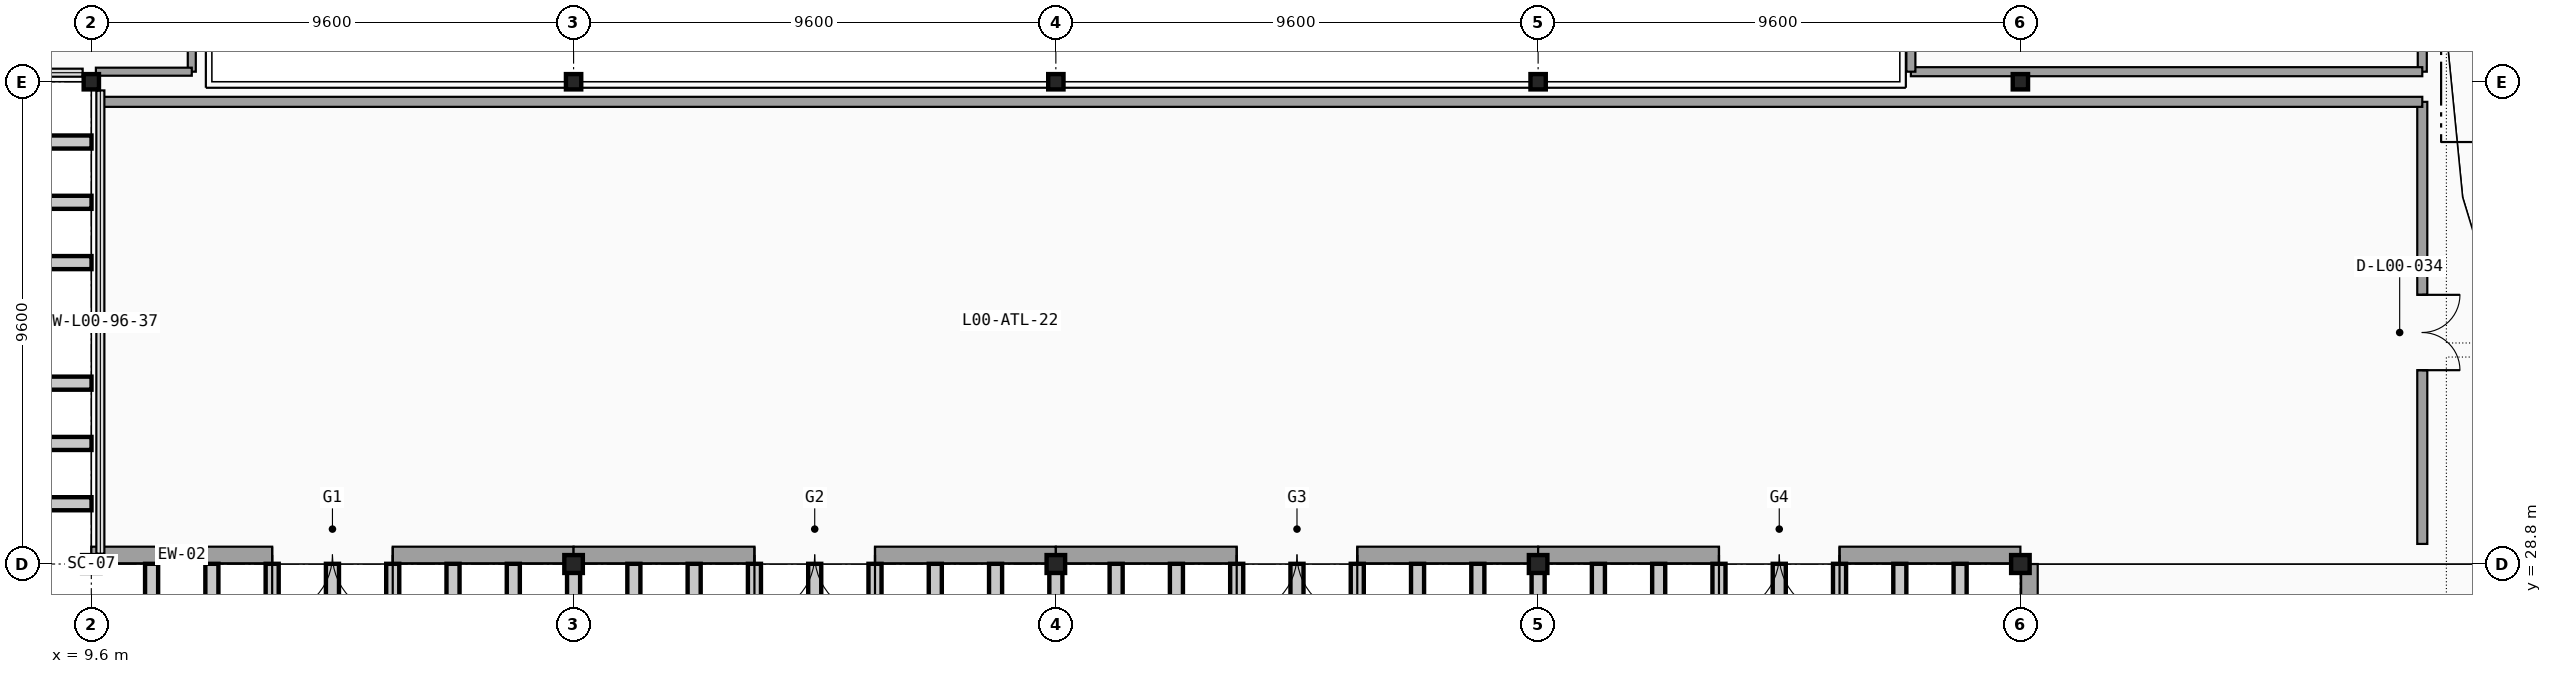
"""IFC4 building model, lengths in metres.
Left out: names, types, materials, properties, quantities, classifications, styles, units other than length and angle.
Written with IfcOpenShell. Run it as: python <this file> out.ifc"""

import sys

from ifc_helpers import new_model, si_unit, direction, frame, frame_2d, origin, origin_2d, place, context, subcontext, project, spatial, rectangle, hollow_rectangle, i_section, extrude, element, fill, save


model = new_model("IFC4")
c1 = context("Model", 3, precision=1e-05, world=origin(), true_north=direction((0.0, 1.0)))
c2 = subcontext(c1, "Body", "Model", "MODEL_VIEW")
j1 = project(units=[si_unit("LENGTHUNIT", "METRE"), si_unit("PLANEANGLEUNIT", "RADIAN")], contexts=[c1])
p1 = place(None, origin())
s1 = spatial("IfcSite", under=j1, at=p1, CompositionType="ELEMENT")
p2 = place(p1, origin())
s2 = spatial("IfcBuilding", under=s1, at=p2, CompositionType="ELEMENT")
p3 = place(p2, origin())
s3 = spatial("IfcBuildingStorey", under=s2, at=p3, CompositionType="ELEMENT", Elevation=0.0)
p4 = place(p3, frame((9.6, 28.8, 0.0), z_axis=(0.0, 0.0, 1.0), x_axis=(1.0, 0.0, 0.0)))
e1 = element("IfcColumn", 1, at=p4, inside=s3, PredefinedType="COLUMN", context=c2, shape_type="SweptSolid", body=[
    extrude(i_section(OverallWidth=0.369, OverallDepth=0.356, WebThickness=0.011, FlangeThickness=0.018, FilletRadius=0.015, at=origin_2d()), origin(), (0.0, 0.0, 1.0), 4.8),
])
p5 = place(p3, frame((9.6, 38.4, 0.0), z_axis=(0.0, 0.0, 1.0), x_axis=(1.0, 0.0, 0.0)))
e2 = element("IfcColumn", 2, at=p5, inside=s3, PredefinedType="COLUMN", context=c2, shape_type="SweptSolid", body=[
    extrude(hollow_rectangle(XDim=0.305, YDim=0.305, WallThickness=0.013, InnerFilletRadius=0.013, OuterFilletRadius=0.025, at=origin_2d()), origin(), (0.0, 0.0, 1.0), 4.8),
])
p6 = place(p3, frame((19.2, 28.8, 0.0), z_axis=(0.0, 0.0, 1.0), x_axis=(1.0, 0.0, 0.0)))
e3 = element("IfcColumn", 3, at=p6, inside=s3, PredefinedType="COLUMN", context=c2, shape_type="SweptSolid", body=[
    extrude(i_section(OverallWidth=0.369, OverallDepth=0.356, WebThickness=0.011, FlangeThickness=0.018, FilletRadius=0.015, at=origin_2d()), origin(), (0.0, 0.0, 1.0), 4.8),
])
p7 = place(p3, frame((19.2, 38.4, 0.0), z_axis=(0.0, 0.0, 1.0), x_axis=(1.0, 0.0, 0.0)))
e4 = element("IfcColumn", 4, at=p7, inside=s3, PredefinedType="COLUMN", context=c2, shape_type="SweptSolid", body=[
    extrude(hollow_rectangle(XDim=0.305, YDim=0.305, WallThickness=0.013, InnerFilletRadius=0.013, OuterFilletRadius=0.025, at=origin_2d()), origin(), (0.0, 0.0, 1.0), 4.8),
])
p8 = place(p3, frame((28.8, 28.8, 0.0), z_axis=(0.0, 0.0, 1.0), x_axis=(1.0, 0.0, 0.0)))
e5 = element("IfcColumn", 5, at=p8, inside=s3, PredefinedType="COLUMN", context=c2, shape_type="SweptSolid", body=[
    extrude(i_section(OverallWidth=0.369, OverallDepth=0.356, WebThickness=0.011, FlangeThickness=0.018, FilletRadius=0.015, at=origin_2d()), origin(), (0.0, 0.0, 1.0), 4.8),
])
p9 = place(p3, frame((28.8, 38.4, 0.0), z_axis=(0.0, 0.0, 1.0), x_axis=(1.0, 0.0, 0.0)))
e6 = element("IfcColumn", 6, at=p9, inside=s3, PredefinedType="COLUMN", context=c2, shape_type="SweptSolid", body=[
    extrude(hollow_rectangle(XDim=0.305, YDim=0.305, WallThickness=0.013, InnerFilletRadius=0.013, OuterFilletRadius=0.025, at=origin_2d()), origin(), (0.0, 0.0, 1.0), 4.8),
])
p10 = place(p3, frame((38.4, 28.8, 0.0), z_axis=(0.0, 0.0, 1.0), x_axis=(1.0, 0.0, 0.0)))
e7 = element("IfcColumn", 7, at=p10, inside=s3, PredefinedType="COLUMN", context=c2, shape_type="SweptSolid", body=[
    extrude(i_section(OverallWidth=0.369, OverallDepth=0.356, WebThickness=0.011, FlangeThickness=0.018, FilletRadius=0.015, at=origin_2d()), origin(), (0.0, 0.0, 1.0), 4.8),
])
p11 = place(p3, frame((38.4, 38.4, 0.0), z_axis=(0.0, 0.0, 1.0), x_axis=(1.0, 0.0, 0.0)))
e8 = element("IfcColumn", 8, at=p11, inside=s3, PredefinedType="COLUMN", context=c2, shape_type="SweptSolid", body=[
    extrude(hollow_rectangle(XDim=0.305, YDim=0.305, WallThickness=0.013, InnerFilletRadius=0.013, OuterFilletRadius=0.025, at=origin_2d()), origin(), (0.0, 0.0, 1.0), 4.8),
])
p12 = place(p3, frame((48.0, 28.8, 0.0), z_axis=(0.0, 0.0, 1.0), x_axis=(1.0, 0.0, 0.0)))
e9 = element("IfcColumn", 9, at=p12, inside=s3, PredefinedType="COLUMN", context=c2, shape_type="SweptSolid", body=[
    extrude(i_section(OverallWidth=0.369, OverallDepth=0.356, WebThickness=0.011, FlangeThickness=0.018, FilletRadius=0.015, at=origin_2d()), origin(), (0.0, 0.0, 1.0), 4.8),
])
p13 = place(p3, frame((48.0, 38.4, 0.0), z_axis=(0.0, 0.0, 1.0), x_axis=(1.0, 0.0, 0.0)))
e10 = element("IfcColumn", 10, at=p13, inside=s3, PredefinedType="COLUMN", context=c2, shape_type="SweptSolid", body=[
    extrude(hollow_rectangle(XDim=0.305, YDim=0.305, WallThickness=0.013, InnerFilletRadius=0.013, OuterFilletRadius=0.025, at=origin_2d()), origin(), (0.0, 0.0, 1.0), 4.8),
])
p14 = place(p3, frame((9.6, 28.98, 0.0), z_axis=(0.0, 0.0, 1.0), x_axis=(1.0, 0.0, 0.0)))
e11 = element("IfcWall", 11, at=p14, inside=s3, PredefinedType="SOLIDWALL", context=c2, shape_type="SweptSolid", body=[
    extrude(rectangle(XDim=9.6, YDim=0.33, at=frame_2d((4.8, 0.0))), origin(), (0.0, 0.0, 1.0), 3.664),
])
p15 = place(p14, frame((6.0, 0.0, 0.0), z_axis=(0.0, 0.0, 1.0), x_axis=(-1.0, 0.0, 0.0)))
e12 = element("IfcOpeningElement", 12, at=p15, cuts=e11, PredefinedType="OPENING", context=c2, shape_type="SweptSolid", body=[
    extrude(rectangle(XDim=2.4, YDim=2.4, at=frame_2d((1.2, 1.2))), frame((0.0, 0.175, 0.0), z_axis=(0.0, -1.0, 0.0), x_axis=(1.0, 0.0, 0.0)), (0.0, 0.0, 1.0), 0.35),
])
p16 = place(p3, frame((19.2, 28.98, 0.0), z_axis=(0.0, 0.0, 1.0), x_axis=(1.0, 0.0, 0.0)))
e13 = element("IfcWall", 13, at=p16, inside=s3, PredefinedType="SOLIDWALL", context=c2, shape_type="SweptSolid", body=[
    extrude(rectangle(XDim=9.6, YDim=0.33, at=frame_2d((4.8, 0.0))), origin(), (0.0, 0.0, 1.0), 3.664),
])
p17 = place(p16, frame((6.0, 0.0, 0.0), z_axis=(0.0, 0.0, 1.0), x_axis=(-1.0, 0.0, 0.0)))
e14 = element("IfcOpeningElement", 14, at=p17, cuts=e13, PredefinedType="OPENING", context=c2, shape_type="SweptSolid", body=[
    extrude(rectangle(XDim=2.4, YDim=2.4, at=frame_2d((1.2, 1.2))), frame((0.0, 0.175, 0.0), z_axis=(0.0, -1.0, 0.0), x_axis=(1.0, 0.0, 0.0)), (0.0, 0.0, 1.0), 0.35),
])
p18 = place(p3, frame((28.8, 28.98, 0.0), z_axis=(0.0, 0.0, 1.0), x_axis=(1.0, 0.0, 0.0)))
e15 = element("IfcWall", 15, at=p18, inside=s3, PredefinedType="SOLIDWALL", context=c2, shape_type="SweptSolid", body=[
    extrude(rectangle(XDim=9.6, YDim=0.33, at=frame_2d((4.8, 0.0))), origin(), (0.0, 0.0, 1.0), 3.664),
])
p19 = place(p18, frame((6.0, 0.0, 0.0), z_axis=(0.0, 0.0, 1.0), x_axis=(-1.0, 0.0, 0.0)))
e16 = element("IfcOpeningElement", 16, at=p19, cuts=e15, PredefinedType="OPENING", context=c2, shape_type="SweptSolid", body=[
    extrude(rectangle(XDim=2.4, YDim=2.4, at=frame_2d((1.2, 1.2))), frame((0.0, 0.175, 0.0), z_axis=(0.0, -1.0, 0.0), x_axis=(1.0, 0.0, 0.0)), (0.0, 0.0, 1.0), 0.35),
])
p20 = place(p3, frame((38.4, 28.98, 0.0), z_axis=(0.0, 0.0, 1.0), x_axis=(1.0, 0.0, 0.0)))
e17 = element("IfcWall", 17, at=p20, inside=s3, PredefinedType="SOLIDWALL", context=c2, shape_type="SweptSolid", body=[
    extrude(rectangle(XDim=9.6, YDim=0.33, at=frame_2d((4.8, 0.0))), origin(), (0.0, 0.0, 1.0), 3.664),
])
p21 = place(p20, frame((6.0, 0.0, 0.0), z_axis=(0.0, 0.0, 1.0), x_axis=(-1.0, 0.0, 0.0)))
e18 = element("IfcOpeningElement", 18, at=p21, cuts=e17, PredefinedType="OPENING", context=c2, shape_type="SweptSolid", body=[
    extrude(rectangle(XDim=2.4, YDim=2.4, at=frame_2d((1.2, 1.2))), frame((0.0, 0.175, 0.0), z_axis=(0.0, -1.0, 0.0), x_axis=(1.0, 0.0, 0.0)), (0.0, 0.0, 1.0), 0.35),
])
p22 = place(p3, frame((48.18, 28.8, 0.0), z_axis=(0.0, 0.0, 1.0), x_axis=(0.0, -1.0, 0.0)))
e19 = element("IfcWall", 19, at=p22, inside=s3, PredefinedType="SOLIDWALL", context=c2, shape_type="SweptSolid", body=[
    extrude(rectangle(XDim=9.6, YDim=0.33, at=frame_2d((4.8, 0.0))), origin(), (0.0, 0.0, 1.0), 3.664),
])
p23 = place(p22, frame((6.0, 0.0, 0.0), z_axis=(0.0, 0.0, 1.0), x_axis=(-1.0, 0.0, 0.0)))
e20 = element("IfcOpeningElement", 20, at=p23, cuts=e19, PredefinedType="OPENING", context=c2, shape_type="SweptSolid", body=[
    extrude(rectangle(XDim=2.4, YDim=2.4, at=frame_2d((1.2, 1.2))), frame((0.0, 0.175, 0.0), z_axis=(0.0, -1.0, 0.0), x_axis=(1.0, 0.0, 0.0)), (0.0, 0.0, 1.0), 0.35),
])
p24 = place(p3, frame((56.0, 38.0, 0.0), z_axis=(0.0, 0.0, 1.0), x_axis=(0.0, -1.0, 0.0)))
e21 = element("IfcWall", 21, at=p24, inside=s3, PredefinedType="PARTITIONING", context=c2, shape_type="SweptSolid", body=[
    extrude(rectangle(XDim=8.8, YDim=0.2, at=frame_2d((4.4, 0.0))), origin(), (0.0, 0.0, 1.0), 3.972),
])
p25 = place(p24, frame((3.842, 0.0, 0.0), z_axis=(0.0, 0.0, 1.0), x_axis=(1.0, 0.0, 0.0)))
e22 = element("IfcOpeningElement", 22, at=p25, cuts=e21, PredefinedType="OPENING", context=c2, shape_type="SweptSolid", body=[
    extrude(rectangle(XDim=1.5, YDim=2.25, at=frame_2d((0.75, 1.125))), frame((0.0, 0.11, 0.0), z_axis=(0.0, -1.0, 0.0), x_axis=(1.0, 0.0, 0.0)), (0.0, 0.0, 1.0), 0.22),
])
p26 = place(p3, frame((9.82, 38.0, 0.0), z_axis=(0.0, 0.0, 1.0), x_axis=(1.0, 0.0, 0.0)))
e23 = element("IfcWall", 23, at=p26, inside=s3, PredefinedType="PARTITIONING", context=c2, shape_type="SweptSolid", body=[
    extrude(rectangle(XDim=46.18, YDim=0.2, at=frame_2d((23.09, 0.0))), origin(), (0.0, 0.0, 1.0), 3.738),
])
p27 = place(p3, frame((56.0, 66.0, 0.0), z_axis=(0.0, 0.0, 1.0), x_axis=(0.0, -1.0, 0.0)))
e24 = element("IfcWall", 24, at=p27, inside=s3, PredefinedType="PARTITIONING", context=c2, shape_type="SweptSolid", body=[
    extrude(rectangle(XDim=27.4, YDim=0.18, at=frame_2d((13.7, 0.0))), origin(), (0.0, 0.0, 1.0), 3.664),
])
p28 = place(p27, frame((2.952, 0.0, 0.0), z_axis=(0.0, 0.0, 1.0), x_axis=(1.0, 0.0, 0.0)))
e25 = element("IfcOpeningElement", 25, at=p28, cuts=e24, PredefinedType="OPENING", context=c2, shape_type="SweptSolid", body=[
    extrude(rectangle(XDim=1.35, YDim=2.25, at=frame_2d((0.675, 1.125))), frame((0.0, 0.1, 0.0), z_axis=(0.0, -1.0, 0.0), x_axis=(1.0, 0.0, 0.0)), (0.0, 0.0, 1.0), 0.2),
])
p29 = place(p3, frame((56.0, 38.6, 0.0), z_axis=(0.0, 0.0, 1.0), x_axis=(-1.0, 0.0, 0.0)))
e26 = element("IfcWall", 26, at=p29, inside=s3, PredefinedType="PARTITIONING", context=c2, shape_type="SweptSolid", body=[
    extrude(rectangle(XDim=10.18, YDim=0.18, at=frame_2d((5.09, 0.0))), origin(), (0.0, 0.0, 1.0), 3.664),
])
p30 = place(p3, frame((45.82, 38.6, 0.0), z_axis=(0.0, 0.0, 1.0), x_axis=(0.0, 1.0, 0.0)))
e27 = element("IfcWall", 27, at=p30, inside=s3, PredefinedType="PARTITIONING", context=c2, shape_type="SweptSolid", body=[
    extrude(rectangle(XDim=27.4, YDim=0.18, at=frame_2d((13.7, 0.0))), origin(), (0.0, 0.0, 1.0), 4.5),
])
p31 = place(p3, frame((11.6, 47.1, 0.0), z_axis=(0.0, 0.0, 1.0), x_axis=(0.0, -1.0, 0.0)))
e28 = element("IfcWall", 28, at=p31, inside=s3, PredefinedType="PARTITIONING", context=c2, shape_type="SweptSolid", body=[
    extrude(rectangle(XDim=8.5, YDim=0.16, at=frame_2d((4.25, 0.0))), origin(), (0.0, 0.0, 1.0), 4.5),
])
p32 = place(p3, frame((11.6, 38.6, 0.0), z_axis=(0.0, 0.0, 1.0), x_axis=(-1.0, 0.0, 0.0)))
e29 = element("IfcWall", 29, at=p32, inside=s3, PredefinedType="PARTITIONING", context=c2, shape_type="SweptSolid", body=[
    extrude(rectangle(XDim=1.909, YDim=0.16, at=frame_2d((0.955, 0.0))), origin(), (0.0, 0.0, 1.0), 3.664),
])
p33 = place(p15, origin())
e30 = element("IfcDoor", 30, at=p33, inside=s3, OperationType="DOUBLE_DOOR_SINGLE_SWING", PredefinedType="DOOR", context=c2, shape_type="SweptSolid", body=[
    extrude(rectangle(XDim=2.4, YDim=2.4, at=frame_2d((1.2, 1.2))), frame((0.0, 0.025, 0.0), z_axis=(0.0, -1.0, 0.0), x_axis=(1.0, 0.0, 0.0)), (0.0, 0.0, 1.0), 0.05),
])
fill(e12, e30)
p34 = place(p17, origin())
e31 = element("IfcDoor", 31, at=p34, inside=s3, OperationType="DOUBLE_DOOR_SINGLE_SWING", PredefinedType="DOOR", context=c2, shape_type="SweptSolid", body=[
    extrude(rectangle(XDim=2.4, YDim=2.4, at=frame_2d((1.2, 1.2))), frame((0.0, 0.025, 0.0), z_axis=(0.0, -1.0, 0.0), x_axis=(1.0, 0.0, 0.0)), (0.0, 0.0, 1.0), 0.05),
])
fill(e14, e31)
p35 = place(p19, origin())
e32 = element("IfcDoor", 32, at=p35, inside=s3, OperationType="DOUBLE_DOOR_SINGLE_SWING", PredefinedType="DOOR", context=c2, shape_type="SweptSolid", body=[
    extrude(rectangle(XDim=2.4, YDim=2.4, at=frame_2d((1.2, 1.2))), frame((0.0, 0.025, 0.0), z_axis=(0.0, -1.0, 0.0), x_axis=(1.0, 0.0, 0.0)), (0.0, 0.0, 1.0), 0.05),
])
fill(e16, e32)
p36 = place(p21, origin())
e33 = element("IfcDoor", 33, at=p36, inside=s3, OperationType="DOUBLE_DOOR_SINGLE_SWING", PredefinedType="DOOR", context=c2, shape_type="SweptSolid", body=[
    extrude(rectangle(XDim=2.4, YDim=2.4, at=frame_2d((1.2, 1.2))), frame((0.0, 0.025, 0.0), z_axis=(0.0, -1.0, 0.0), x_axis=(1.0, 0.0, 0.0)), (0.0, 0.0, 1.0), 0.05),
])
fill(e18, e33)
p37 = place(p25, origin())
e34 = element("IfcDoor", 34, at=p37, inside=s3, OperationType="DOUBLE_DOOR_SINGLE_SWING", PredefinedType="DOOR", context=c2, shape_type="SweptSolid", body=[
    extrude(rectangle(XDim=1.5, YDim=2.25, at=frame_2d((0.75, 1.125))), frame((0.0, 0.025, 0.0), z_axis=(0.0, -1.0, 0.0), x_axis=(1.0, 0.0, 0.0)), (0.0, 0.0, 1.0), 0.05),
])
fill(e22, e34)
save(model, sys.argv[1])
